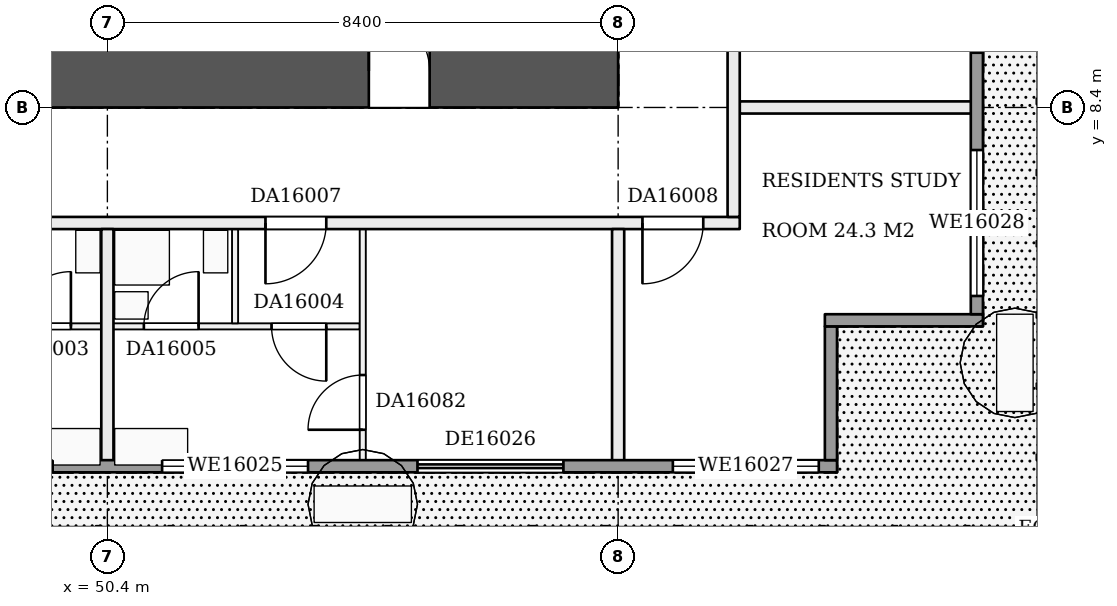
"""IFC4 building model, lengths in metres.
Left out: names, types, materials, properties, quantities, classifications, styles, units other than length and angle.
Written with IfcOpenShell. Run it as: python <this file> out.ifc"""

import sys

from ifc_helpers import new_model, si_unit, direction, frame, frame_2d, origin, place, context, subcontext, project, spatial, rectangle, extrude, element, fill, save


model = new_model("IFC4")
c1 = context("Model", 3, precision=1e-05, world=origin(), true_north=direction((0.0, 1.0)))
c2 = subcontext(c1, "Body", "Model", "MODEL_VIEW")
j1 = project(units=[si_unit("LENGTHUNIT", "METRE"), si_unit("PLANEANGLEUNIT", "RADIAN")], contexts=[c1])
p1 = place(None, origin())
s1 = spatial("IfcSite", under=j1, at=p1, CompositionType="ELEMENT")
p2 = place(p1, origin())
s2 = spatial("IfcBuilding", under=s1, at=p2, CompositionType="ELEMENT")
p3 = place(p2, frame((0.0, 0.0, 67.2)))
s3 = spatial("IfcBuildingStorey", under=s2, at=p3, CompositionType="ELEMENT", Elevation=67.2)
p4 = place(p3, frame((42.0, 9.0, 0.0), z_axis=(0.0, 0.0, 1.0), x_axis=(1.0, 0.0, 0.0)))
e1 = element("IfcWall", 1, at=p4, inside=s3, PredefinedType="SHEAR", context=c2, shape_type="SweptSolid", body=[
    extrude(rectangle(XDim=16.8, YDim=1.2, at=frame_2d((8.4, 0.0))), origin(), (0.0, 0.0, 1.0), 3.22),
])
p5 = place(p4, frame((3.1, 0.0, 0.0)))
e2 = element("IfcOpeningElement", 2, at=p5, cuts=e1, PredefinedType="OPENING", context=c2, shape_type="SweptSolid", body=[
    extrude(rectangle(XDim=1.0, YDim=2.1, at=frame_2d((0.5, 1.05))), frame((0.0, 0.61, 0.0), z_axis=(0.0, -1.0, 0.0), x_axis=(1.0, 0.0, 0.0)), (0.0, 0.0, 1.0), 1.22),
])
p6 = place(p4, frame((12.7, 0.0, 0.0)))
e3 = element("IfcOpeningElement", 3, at=p6, cuts=e1, PredefinedType="OPENING", context=c2, shape_type="SweptSolid", body=[
    extrude(rectangle(XDim=1.0, YDim=2.1, at=frame_2d((0.5, 1.05))), frame((0.0, 0.61, 0.0), z_axis=(0.0, -1.0, 0.0), x_axis=(1.0, 0.0, 0.0)), (0.0, 0.0, 1.0), 1.22),
])
p7 = place(p3, frame((46.25, 4.8, 0.0), z_axis=(0.0, 0.0, 1.0), x_axis=(1.0, 0.0, 0.0)))
e4 = element("IfcWall", 4, at=p7, inside=s3, PredefinedType="PARTITIONING", context=c2, shape_type="SweptSolid", body=[
    extrude(rectangle(XDim=8.3, YDim=0.1, at=frame_2d((4.15, 0.0))), origin(), (0.0, 0.0, 1.0), 3.22),
])
p8 = place(p7, frame((0.55, 0.0, 0.0)))
e5 = element("IfcOpeningElement", 5, at=p8, cuts=e4, PredefinedType="OPENING", context=c2, shape_type="SweptSolid", body=[
    extrude(rectangle(XDim=0.9, YDim=2.1, at=frame_2d((0.45, 1.05))), frame((0.0, 0.06, 0.0), z_axis=(0.0, -1.0, 0.0), x_axis=(1.0, 0.0, 0.0)), (0.0, 0.0, 1.0), 0.12),
])
p9 = place(p7, frame((2.65, 0.0, 0.0)))
e6 = element("IfcOpeningElement", 6, at=p9, cuts=e4, PredefinedType="OPENING", context=c2, shape_type="SweptSolid", body=[
    extrude(rectangle(XDim=0.9, YDim=2.1, at=frame_2d((0.45, 1.05))), frame((0.0, 0.06, 0.0), z_axis=(0.0, -1.0, 0.0), x_axis=(1.0, 0.0, 0.0)), (0.0, 0.0, 1.0), 0.12),
])
p10 = place(p7, frame((6.85, 0.0, 0.0)))
e7 = element("IfcOpeningElement", 7, at=p10, cuts=e4, PredefinedType="OPENING", context=c2, shape_type="SweptSolid", body=[
    extrude(rectangle(XDim=0.9, YDim=2.1, at=frame_2d((0.45, 1.05))), frame((0.0, 0.06, 0.0), z_axis=(0.0, -1.0, 0.0), x_axis=(1.0, 0.0, 0.0)), (0.0, 0.0, 1.0), 0.12),
])
p11 = place(p7, frame((4.75, 0.0, 0.0)))
e8 = element("IfcOpeningElement", 8, at=p11, cuts=e4, PredefinedType="OPENING", context=c2, shape_type="SweptSolid", body=[
    extrude(rectangle(XDim=0.9, YDim=2.1, at=frame_2d((0.45, 1.05))), frame((0.0, 0.06, 0.0), z_axis=(0.0, -1.0, 0.0), x_axis=(1.0, 0.0, 0.0)), (0.0, 0.0, 1.0), 0.12),
])
p12 = place(p3, frame((42.1, 6.5, 0.0), z_axis=(0.0, 0.0, 1.0), x_axis=(1.0, 0.0, 0.0)))
e9 = element("IfcWall", 9, at=p12, inside=s3, PredefinedType="PARTITIONING", context=c2, shape_type="SweptSolid", body=[
    extrude(rectangle(XDim=18.7, YDim=0.2, at=frame_2d((9.35, 0.0))), origin(), (0.0, 0.0, 1.0), 3.22),
])
p13 = place(p12, frame((4.6, 0.0, 0.0)))
e10 = element("IfcOpeningElement", 10, at=p13, cuts=e9, PredefinedType="OPENING", context=c2, shape_type="SweptSolid", body=[
    extrude(rectangle(XDim=1.0, YDim=2.1, at=frame_2d((0.5, 1.05))), frame((0.0, 0.11, 0.0), z_axis=(0.0, -1.0, 0.0), x_axis=(1.0, 0.0, 0.0)), (0.0, 0.0, 1.0), 0.22),
])
p14 = place(p12, frame((10.9, 0.0, 0.0)))
e11 = element("IfcOpeningElement", 11, at=p14, cuts=e9, PredefinedType="OPENING", context=c2, shape_type="SweptSolid", body=[
    extrude(rectangle(XDim=1.0, YDim=2.1, at=frame_2d((0.5, 1.05))), frame((0.0, 0.11, 0.0), z_axis=(0.0, -1.0, 0.0), x_axis=(1.0, 0.0, 0.0)), (0.0, 0.0, 1.0), 0.22),
])
p15 = place(p12, frame((17.1, 0.0, 0.0)))
e12 = element("IfcOpeningElement", 12, at=p15, cuts=e9, PredefinedType="OPENING", context=c2, shape_type="SweptSolid", body=[
    extrude(rectangle(XDim=1.0, YDim=2.1, at=frame_2d((0.5, 1.05))), frame((0.0, 0.11, 0.0), z_axis=(0.0, -1.0, 0.0), x_axis=(1.0, 0.0, 0.0)), (0.0, 0.0, 1.0), 0.22),
])
for number, where, z_axis, x_axis in (
    (13, (60.8, 8.4, 0.0), (0.0, 0.0, 1.0), (1.0, 0.0, 0.0)),
    (14, (50.4, 2.5, 0.0), (0.0, 0.0, 1.0), (0.0, 1.0, 0.0)),
):
    element("IfcWall", number, at=place(p3, frame(where, z_axis=z_axis, x_axis=x_axis)), inside=s3, PredefinedType="PARTITIONING", context=c2, shape_type="SweptSolid", body=[
        extrude(rectangle(XDim=3.9, YDim=0.2, at=frame_2d((1.95, 0.0))), origin(), (0.0, 0.0, 1.0), 3.22),
    ])
p16 = place(p3, frame((52.5, 4.85, 0.0), z_axis=(0.0, 0.0, 1.0), x_axis=(0.0, 1.0, 0.0)))
e15 = element("IfcWall", 15, at=p16, inside=s3, PredefinedType="PARTITIONING", context=c2, shape_type="SweptSolid", body=[
    extrude(rectangle(XDim=1.55, YDim=0.1, at=frame_2d((0.775, 0.0))), origin(), (0.0, 0.0, 1.0), 3.22),
])
p17 = place(p3, frame((54.6, 2.5, 0.0), z_axis=(0.0, 0.0, 1.0), x_axis=(0.0, 1.0, 0.0)))
e16 = element("IfcWall", 16, at=p17, inside=s3, PredefinedType="PARTITIONING", context=c2, shape_type="SweptSolid", body=[
    extrude(rectangle(XDim=3.9, YDim=0.1, at=frame_2d((1.95, 0.0))), origin(), (0.0, 0.0, 1.0), 3.22),
])
p18 = place(p17, frame((0.6, 0.0, 0.0)))
e17 = element("IfcOpeningElement", 17, at=p18, cuts=e16, PredefinedType="OPENING", context=c2, shape_type="SweptSolid", body=[
    extrude(rectangle(XDim=0.9, YDim=2.1, at=frame_2d((0.45, 1.05))), frame((0.0, 0.06, 0.0), z_axis=(0.0, -1.0, 0.0), x_axis=(1.0, 0.0, 0.0)), (0.0, 0.0, 1.0), 0.12),
])
p19 = place(p3, frame((58.8, 2.5, 0.0), z_axis=(0.0, 0.0, 1.0), x_axis=(0.0, 1.0, 0.0)))
e18 = element("IfcWall", 18, at=p19, inside=s3, PredefinedType="PARTITIONING", context=c2, shape_type="SweptSolid", body=[
    extrude(rectangle(XDim=3.9, YDim=0.2, at=frame_2d((1.95, 0.0))), origin(), (0.0, 0.0, 1.0), 3.22),
])
p20 = place(p3, frame((60.7, 6.6, 0.0), z_axis=(0.0, 0.0, 1.0), x_axis=(0.0, 1.0, 0.0)))
e19 = element("IfcWall", 19, at=p20, inside=s3, PredefinedType="PARTITIONING", context=c2, shape_type="SweptSolid", body=[
    extrude(rectangle(XDim=14.6, YDim=0.2, at=frame_2d((7.3, 0.0))), origin(), (0.0, 0.0, 1.0), 3.22),
])
p21 = place(p20, frame((6.5, 0.0, 0.0)))
e20 = element("IfcOpeningElement", 20, at=p21, cuts=e19, PredefinedType="OPENING", context=c2, shape_type="SweptSolid", body=[
    extrude(rectangle(XDim=1.0, YDim=2.1, at=frame_2d((0.5, 1.05))), frame((0.0, 0.11, 0.0), z_axis=(0.0, -1.0, 0.0), x_axis=(1.0, 0.0, 0.0)), (0.0, 0.0, 1.0), 0.22),
])
p22 = place(p20, frame((11.9, 0.0, 0.0)))
e21 = element("IfcOpeningElement", 21, at=p22, cuts=e19, PredefinedType="OPENING", context=c2, shape_type="SweptSolid", body=[
    extrude(rectangle(XDim=1.0, YDim=2.1, at=frame_2d((0.5, 1.05))), frame((0.0, 0.11, 0.0), z_axis=(0.0, -1.0, 0.0), x_axis=(1.0, 0.0, 0.0)), (0.0, 0.0, 1.0), 0.22),
])
p23 = place(p3, frame((4.8, 2.5, 0.0), z_axis=(0.0, 0.0, 1.0), x_axis=(1.0, 0.0, 0.0)))
e22 = element("IfcWall", 22, at=p23, inside=s3, PredefinedType="SOLIDWALL", context=c2, shape_type="SweptSolid", body=[
    extrude(rectangle(XDim=57.6, YDim=0.2, at=frame_2d((28.8, 0.0))), origin(), (0.0, 0.0, 1.0), 3.22),
])
p24 = place(p23, frame((0.3, 0.0, 0.0)))
e23 = element("IfcOpeningElement", 23, at=p24, cuts=e22, PredefinedType="OPENING", context=c2, shape_type="SweptSolid", body=[
    extrude(rectangle(XDim=2.4, YDim=2.2, at=frame_2d((1.2, 1.1))), frame((0.0, 0.11, 0.0), z_axis=(0.0, -1.0, 0.0), x_axis=(1.0, 0.0, 0.0)), (0.0, 0.0, 1.0), 0.22),
])
p25 = place(p23, frame((4.5, 0.0, 0.9)))
e24 = element("IfcOpeningElement", 24, at=p25, cuts=e22, PredefinedType="OPENING", context=c2, shape_type="SweptSolid", body=[
    extrude(rectangle(XDim=2.4, YDim=1.5, at=frame_2d((1.2, 0.75))), frame((0.0, 0.11, 0.0), z_axis=(0.0, -1.0, 0.0), x_axis=(1.0, 0.0, 0.0)), (0.0, 0.0, 1.0), 0.22),
])
p26 = place(p23, frame((8.7, 0.0, 0.9)))
e25 = element("IfcOpeningElement", 25, at=p26, cuts=e22, PredefinedType="OPENING", context=c2, shape_type="SweptSolid", body=[
    extrude(rectangle(XDim=2.4, YDim=1.5, at=frame_2d((1.2, 0.75))), frame((0.0, 0.11, 0.0), z_axis=(0.0, -1.0, 0.0), x_axis=(1.0, 0.0, 0.0)), (0.0, 0.0, 1.0), 0.22),
])
p27 = place(p23, frame((12.9, 0.0, 0.0)))
e26 = element("IfcOpeningElement", 26, at=p27, cuts=e22, PredefinedType="OPENING", context=c2, shape_type="SweptSolid", body=[
    extrude(rectangle(XDim=2.4, YDim=2.2, at=frame_2d((1.2, 1.1))), frame((0.0, 0.11, 0.0), z_axis=(0.0, -1.0, 0.0), x_axis=(1.0, 0.0, 0.0)), (0.0, 0.0, 1.0), 0.22),
])
p28 = place(p23, frame((17.1, 0.0, 0.9)))
e27 = element("IfcOpeningElement", 27, at=p28, cuts=e22, PredefinedType="OPENING", context=c2, shape_type="SweptSolid", body=[
    extrude(rectangle(XDim=2.4, YDim=1.5, at=frame_2d((1.2, 0.75))), frame((0.0, 0.11, 0.0), z_axis=(0.0, -1.0, 0.0), x_axis=(1.0, 0.0, 0.0)), (0.0, 0.0, 1.0), 0.22),
])
p29 = place(p23, frame((21.3, 0.0, 0.0)))
e28 = element("IfcOpeningElement", 28, at=p29, cuts=e22, PredefinedType="OPENING", context=c2, shape_type="SweptSolid", body=[
    extrude(rectangle(XDim=2.4, YDim=2.2, at=frame_2d((1.2, 1.1))), frame((0.0, 0.11, 0.0), z_axis=(0.0, -1.0, 0.0), x_axis=(1.0, 0.0, 0.0)), (0.0, 0.0, 1.0), 0.22),
])
p30 = place(p23, frame((25.5, 0.0, 0.0)))
e29 = element("IfcOpeningElement", 29, at=p30, cuts=e22, PredefinedType="OPENING", context=c2, shape_type="SweptSolid", body=[
    extrude(rectangle(XDim=2.4, YDim=2.2, at=frame_2d((1.2, 1.1))), frame((0.0, 0.11, 0.0), z_axis=(0.0, -1.0, 0.0), x_axis=(1.0, 0.0, 0.0)), (0.0, 0.0, 1.0), 0.22),
])
p31 = place(p23, frame((29.7, 0.0, 0.0)))
e30 = element("IfcOpeningElement", 30, at=p31, cuts=e22, PredefinedType="OPENING", context=c2, shape_type="SweptSolid", body=[
    extrude(rectangle(XDim=2.4, YDim=2.2, at=frame_2d((1.2, 1.1))), frame((0.0, 0.11, 0.0), z_axis=(0.0, -1.0, 0.0), x_axis=(1.0, 0.0, 0.0)), (0.0, 0.0, 1.0), 0.22),
])
p32 = place(p23, frame((33.9, 0.0, 0.9)))
e31 = element("IfcOpeningElement", 31, at=p32, cuts=e22, PredefinedType="OPENING", context=c2, shape_type="SweptSolid", body=[
    extrude(rectangle(XDim=2.4, YDim=1.5, at=frame_2d((1.2, 0.75))), frame((0.0, 0.11, 0.0), z_axis=(0.0, -1.0, 0.0), x_axis=(1.0, 0.0, 0.0)), (0.0, 0.0, 1.0), 0.22),
])
p33 = place(p23, frame((38.1, 0.0, 0.0)))
e32 = element("IfcOpeningElement", 32, at=p33, cuts=e22, PredefinedType="OPENING", context=c2, shape_type="SweptSolid", body=[
    extrude(rectangle(XDim=2.4, YDim=2.2, at=frame_2d((1.2, 1.1))), frame((0.0, 0.11, 0.0), z_axis=(0.0, -1.0, 0.0), x_axis=(1.0, 0.0, 0.0)), (0.0, 0.0, 1.0), 0.22),
])
p34 = place(p23, frame((42.3, 0.0, 0.9)))
e33 = element("IfcOpeningElement", 33, at=p34, cuts=e22, PredefinedType="OPENING", context=c2, shape_type="SweptSolid", body=[
    extrude(rectangle(XDim=2.4, YDim=1.5, at=frame_2d((1.2, 0.75))), frame((0.0, 0.11, 0.0), z_axis=(0.0, -1.0, 0.0), x_axis=(1.0, 0.0, 0.0)), (0.0, 0.0, 1.0), 0.22),
])
p35 = place(p23, frame((46.5, 0.0, 0.9)))
e34 = element("IfcOpeningElement", 34, at=p35, cuts=e22, PredefinedType="OPENING", context=c2, shape_type="SweptSolid", body=[
    extrude(rectangle(XDim=2.4, YDim=1.5, at=frame_2d((1.2, 0.75))), frame((0.0, 0.11, 0.0), z_axis=(0.0, -1.0, 0.0), x_axis=(1.0, 0.0, 0.0)), (0.0, 0.0, 1.0), 0.22),
])
p36 = place(p23, frame((50.7, 0.0, 0.0)))
e35 = element("IfcOpeningElement", 35, at=p36, cuts=e22, PredefinedType="OPENING", context=c2, shape_type="SweptSolid", body=[
    extrude(rectangle(XDim=2.4, YDim=2.2, at=frame_2d((1.2, 1.1))), frame((0.0, 0.11, 0.0), z_axis=(0.0, -1.0, 0.0), x_axis=(1.0, 0.0, 0.0)), (0.0, 0.0, 1.0), 0.22),
])
p37 = place(p23, frame((54.9, 0.0, 0.9)))
e36 = element("IfcOpeningElement", 36, at=p37, cuts=e22, PredefinedType="OPENING", context=c2, shape_type="SweptSolid", body=[
    extrude(rectangle(XDim=2.4, YDim=1.5, at=frame_2d((1.2, 0.75))), frame((0.0, 0.11, 0.0), z_axis=(0.0, -1.0, 0.0), x_axis=(1.0, 0.0, 0.0)), (0.0, 0.0, 1.0), 0.22),
])
p38 = place(p3, frame((62.3, 2.6, 0.0), z_axis=(0.0, 0.0, 1.0), x_axis=(0.0, 1.0, 0.0)))
e37 = element("IfcWall", 37, at=p38, inside=s3, PredefinedType="SOLIDWALL", context=c2, shape_type="SweptSolid", body=[
    extrude(rectangle(XDim=2.2, YDim=0.2, at=frame_2d((1.1, 0.0))), origin(), (0.0, 0.0, 1.0), 3.22),
])
p39 = place(p3, frame((62.2, 4.9, 0.0), z_axis=(0.0, 0.0, 1.0), x_axis=(1.0, 0.0, 0.0)))
e38 = element("IfcWall", 38, at=p39, inside=s3, PredefinedType="SOLIDWALL", context=c2, shape_type="SweptSolid", body=[
    extrude(rectangle(XDim=2.6, YDim=0.2, at=frame_2d((1.3, 0.0))), origin(), (0.0, 0.0, 1.0), 3.22),
])
p40 = place(p3, frame((64.7, 5.0, 0.0), z_axis=(0.0, 0.0, 1.0), x_axis=(0.0, 1.0, 0.0)))
e39 = element("IfcWall", 39, at=p40, inside=s3, PredefinedType="SOLIDWALL", context=c2, shape_type="SweptSolid", body=[
    extrude(rectangle(XDim=15.2, YDim=0.2, at=frame_2d((7.6, 0.0))), origin(), (0.0, 0.0, 1.0), 3.22),
])
p41 = place(p40, frame((0.3, 0.0, 0.9)))
e40 = element("IfcOpeningElement", 40, at=p41, cuts=e39, PredefinedType="OPENING", context=c2, shape_type="SweptSolid", body=[
    extrude(rectangle(XDim=2.4, YDim=1.5, at=frame_2d((1.2, 0.75))), frame((0.0, 0.11, 0.0), z_axis=(0.0, -1.0, 0.0), x_axis=(1.0, 0.0, 0.0)), (0.0, 0.0, 1.0), 0.22),
])
p42 = place(p40, frame((4.3, 0.0, 0.0)))
e41 = element("IfcOpeningElement", 41, at=p42, cuts=e39, PredefinedType="OPENING", context=c2, shape_type="SweptSolid", body=[
    extrude(rectangle(XDim=2.4, YDim=2.2, at=frame_2d((1.2, 1.1))), frame((0.0, 0.11, 0.0), z_axis=(0.0, -1.0, 0.0), x_axis=(1.0, 0.0, 0.0)), (0.0, 0.0, 1.0), 0.22),
])
p43 = place(p40, frame((8.5, 0.0, 0.9)))
e42 = element("IfcOpeningElement", 42, at=p43, cuts=e39, PredefinedType="OPENING", context=c2, shape_type="SweptSolid", body=[
    extrude(rectangle(XDim=2.4, YDim=1.5, at=frame_2d((1.2, 0.75))), frame((0.0, 0.11, 0.0), z_axis=(0.0, -1.0, 0.0), x_axis=(1.0, 0.0, 0.0)), (0.0, 0.0, 1.0), 0.22),
])
p44 = place(p40, frame((12.5, 0.0, 0.9)))
e43 = element("IfcOpeningElement", 43, at=p44, cuts=e39, PredefinedType="OPENING", context=c2, shape_type="SweptSolid", body=[
    extrude(rectangle(XDim=2.4, YDim=1.5, at=frame_2d((1.2, 0.75))), frame((0.0, 0.11, 0.0), z_axis=(0.0, -1.0, 0.0), x_axis=(1.0, 0.0, 0.0)), (0.0, 0.0, 1.0), 0.22),
])
p45 = place(p6, origin())
e44 = element("IfcDoor", 44, at=p45, inside=s3, OperationType="SINGLE_SWING_LEFT", PredefinedType="DOOR", context=c2, shape_type="SweptSolid", body=[
    extrude(rectangle(XDim=1.0, YDim=2.1, at=frame_2d((0.5, 1.05))), frame((0.0, 0.025, 0.0), z_axis=(0.0, -1.0, 0.0), x_axis=(1.0, 0.0, 0.0)), (0.0, 0.0, 1.0), 0.05),
])
fill(e3, e44)
p46 = place(p9, origin())
e45 = element("IfcDoor", 45, at=p46, inside=s3, OperationType="SINGLE_SWING_RIGHT", PredefinedType="DOOR", context=c2, shape_type="SweptSolid", body=[
    extrude(rectangle(XDim=0.9, YDim=2.1, at=frame_2d((0.45, 1.05))), frame((0.0, 0.025, 0.0), z_axis=(0.0, -1.0, 0.0), x_axis=(1.0, 0.0, 0.0)), (0.0, 0.0, 1.0), 0.05),
])
fill(e6, e45)
p47 = place(p10, frame((0.9, 0.0, 0.0), z_axis=(0.0, 0.0, 1.0), x_axis=(-1.0, 0.0, 0.0)))
e46 = element("IfcDoor", 46, at=p47, inside=s3, OperationType="SINGLE_SWING_LEFT", PredefinedType="DOOR", context=c2, shape_type="SweptSolid", body=[
    extrude(rectangle(XDim=0.9, YDim=2.1, at=frame_2d((0.45, 1.05))), frame((0.0, 0.025, 0.0), z_axis=(0.0, -1.0, 0.0), x_axis=(1.0, 0.0, 0.0)), (0.0, 0.0, 1.0), 0.05),
])
fill(e7, e46)
p48 = place(p11, origin())
e47 = element("IfcDoor", 47, at=p48, inside=s3, OperationType="SINGLE_SWING_RIGHT", PredefinedType="DOOR", context=c2, shape_type="SweptSolid", body=[
    extrude(rectangle(XDim=0.9, YDim=2.1, at=frame_2d((0.45, 1.05))), frame((0.0, 0.025, 0.0), z_axis=(0.0, -1.0, 0.0), x_axis=(1.0, 0.0, 0.0)), (0.0, 0.0, 1.0), 0.05),
])
fill(e8, e47)
p49 = place(p14, frame((1.0, 0.0, 0.0), z_axis=(0.0, 0.0, 1.0), x_axis=(-1.0, 0.0, 0.0)))
e48 = element("IfcDoor", 48, at=p49, inside=s3, OperationType="SINGLE_SWING_RIGHT", PredefinedType="DOOR", context=c2, shape_type="SweptSolid", body=[
    extrude(rectangle(XDim=1.0, YDim=2.1, at=frame_2d((0.5, 1.05))), frame((0.0, 0.025, 0.0), z_axis=(0.0, -1.0, 0.0), x_axis=(1.0, 0.0, 0.0)), (0.0, 0.0, 1.0), 0.05),
])
fill(e11, e48)
p50 = place(p15, frame((1.0, 0.0, 0.0), z_axis=(0.0, 0.0, 1.0), x_axis=(-1.0, 0.0, 0.0)))
e49 = element("IfcDoor", 49, at=p50, inside=s3, OperationType="SINGLE_SWING_RIGHT", PredefinedType="DOOR", context=c2, shape_type="SweptSolid", body=[
    extrude(rectangle(XDim=1.0, YDim=2.1, at=frame_2d((0.5, 1.05))), frame((0.0, 0.025, 0.0), z_axis=(0.0, -1.0, 0.0), x_axis=(1.0, 0.0, 0.0)), (0.0, 0.0, 1.0), 0.05),
])
fill(e12, e49)
p51 = place(p18, origin())
e50 = element("IfcDoor", 50, at=p51, inside=s3, OperationType="SINGLE_SWING_LEFT", PredefinedType="DOOR", context=c2, shape_type="SweptSolid", body=[
    extrude(rectangle(XDim=0.9, YDim=2.1, at=frame_2d((0.45, 1.05))), frame((0.0, 0.025, 0.0), z_axis=(0.0, -1.0, 0.0), x_axis=(1.0, 0.0, 0.0)), (0.0, 0.0, 1.0), 0.05),
])
fill(e17, e50)
p52 = place(p35, origin())
e51 = element("IfcWindow", 51, at=p52, inside=s3, PartitioningType="SINGLE_PANEL", PredefinedType="WINDOW", context=c2, shape_type="SweptSolid", body=[
    extrude(rectangle(XDim=2.4, YDim=1.5, at=frame_2d((1.2, 0.75))), frame((0.0, 0.03, 0.0), z_axis=(0.0, -1.0, 0.0), x_axis=(1.0, 0.0, 0.0)), (0.0, 0.0, 1.0), 0.06),
])
fill(e34, e51)
p53 = place(p36, origin())
e52 = element("IfcDoor", 52, at=p53, inside=s3, OperationType="DOUBLE_DOOR_SLIDING", PredefinedType="DOOR", context=c2, shape_type="SweptSolid", body=[
    extrude(rectangle(XDim=2.4, YDim=2.2, at=frame_2d((1.2, 1.1))), frame((0.0, 0.025, 0.0), z_axis=(0.0, -1.0, 0.0), x_axis=(1.0, 0.0, 0.0)), (0.0, 0.0, 1.0), 0.05),
])
fill(e35, e52)
p54 = place(p37, origin())
e53 = element("IfcWindow", 53, at=p54, inside=s3, PartitioningType="SINGLE_PANEL", PredefinedType="WINDOW", context=c2, shape_type="SweptSolid", body=[
    extrude(rectangle(XDim=2.4, YDim=1.5, at=frame_2d((1.2, 0.75))), frame((0.0, 0.03, 0.0), z_axis=(0.0, -1.0, 0.0), x_axis=(1.0, 0.0, 0.0)), (0.0, 0.0, 1.0), 0.06),
])
fill(e36, e53)
p55 = place(p41, origin())
e54 = element("IfcWindow", 54, at=p55, inside=s3, PartitioningType="SINGLE_PANEL", PredefinedType="WINDOW", context=c2, shape_type="SweptSolid", body=[
    extrude(rectangle(XDim=2.4, YDim=1.5, at=frame_2d((1.2, 0.75))), frame((0.0, 0.03, 0.0), z_axis=(0.0, -1.0, 0.0), x_axis=(1.0, 0.0, 0.0)), (0.0, 0.0, 1.0), 0.06),
])
fill(e40, e54)
save(model, sys.argv[1])
